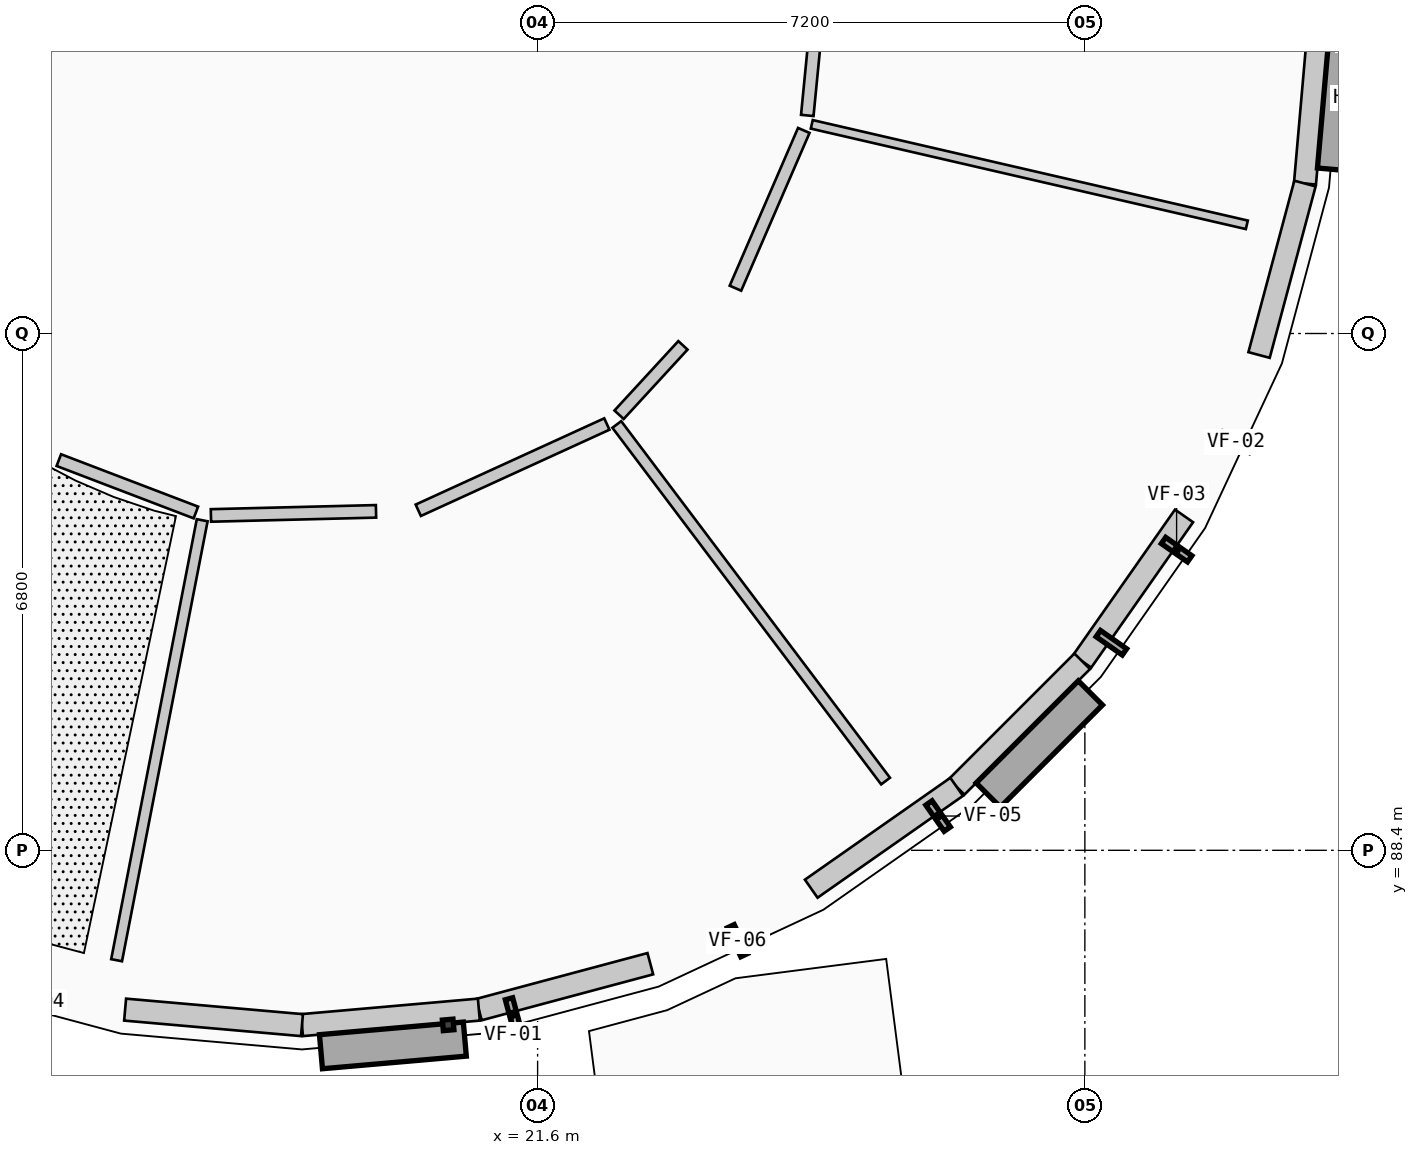
"""IFC4 building model, lengths in metres.
Left out: names, types, materials, properties, quantities, classifications, styles, units other than length and angle.
Written with IfcOpenShell. Run it as: python <this file> out.ifc"""

import sys

from ifc_helpers import new_model, si_unit, direction, frame, frame_2d, origin, origin_2d, place, context, subcontext, project, spatial, rectangle, circle, extrude, element, fill, save


model = new_model("IFC4")
c1 = context("Model", 3, precision=1e-05, world=origin(), true_north=direction((0.0, 1.0)))
c2 = subcontext(c1, "Body", "Model", "MODEL_VIEW")
j1 = project(units=[si_unit("LENGTHUNIT", "METRE"), si_unit("PLANEANGLEUNIT", "RADIAN")], contexts=[c1])
p1 = place(None, origin())
s1 = spatial("IfcSite", under=j1, at=p1, CompositionType="ELEMENT")
p2 = place(p1, origin())
s2 = spatial("IfcBuilding", under=s1, at=p2, CompositionType="ELEMENT")
p3 = place(p2, frame((0.0, 0.0, 4.55)))
s3 = spatial("IfcBuildingStorey", under=s2, at=p3, CompositionType="ELEMENT", Elevation=4.55)
for number, where, z_axis, x_axis in (
    (1, (16.263, 86.816, 0.0), (0.0, 0.0, 1.0), (1.0, 0.0, 0.0)),
    (2, (20.737, 86.816, 0.0), (0.0, 0.0, 1.0), (1.0, 0.0, 0.0)),
    (3, (24.94, 88.346, 0.0), (0.0, 0.0, 1.0), (1.0, 0.0, 0.0)),
    (4, (28.367, 91.221, 0.0), (0.0, 0.0, 1.0), (1.0, 0.0, 0.0)),
    (5, (30.603, 95.095, 0.0), (0.0, 0.0, 1.0), (1.0, 0.0, 0.0)),
    (6, (15.1, 93.611, 0.0), (0.0, 0.0, 1.0), (1.0, 0.0, 0.0)),
    (7, (19.681, 92.803, 0.0), (0.0, 0.0, 1.0), (1.0, 0.0, 0.0)),
    (8, (23.709, 95.129, 0.0), (0.0, 0.0, 1.0), (1.0, 0.0, 0.0)),
):
    element("IfcColumn", number, at=place(p3, frame(where, z_axis=z_axis, x_axis=x_axis)), inside=s3, PredefinedType="COLUMN", context=c2, shape_type="SweptSolid", body=[
        extrude(rectangle(XDim=0.42, YDim=0.42, at=origin_2d()), origin(), (0.0, 0.0, 1.0), 4.2),
    ])
for number, where, z_axis, x_axis in (
    (9, (22.436, 86.342, 0.0), (0.0, 0.0, 1.0), (1.0, 0.0, 0.0)),
    (10, (26.006, 86.802, 0.0), (0.0, 0.0, 1.0), (1.0, 0.0, 0.0)),
):
    element("IfcColumn", number, at=place(p3, frame(where, z_axis=z_axis, x_axis=x_axis)), inside=s3, PredefinedType="PILASTER", context=c2, shape_type="SweptSolid", body=[
        extrude(circle(Radius=0.19, at=origin_2d()), origin(), (0.0, 0.0, 1.0), 4.2),
    ])
p4 = place(p3, frame((31.9, 99.5, 0.0), z_axis=(0.0, 0.0, 1.0), x_axis=(-0.087274565792, -0.996184295282, 0.0)))
e11 = element("IfcWall", 11, at=p4, inside=s3, PredefinedType="ELEMENTEDWALL", context=c2, shape_type="SweptSolid", body=[
    extrude(rectangle(XDim=2.336, YDim=0.29, at=frame_2d((1.168, 0.0))), origin(), (0.0, 0.0, 1.0), 3.309),
])
p5 = place(p4, frame((0.568, 0.0, 0.85)))
e12 = element("IfcOpeningElement", 12, at=p5, cuts=e11, PredefinedType="OPENING", context=c2, shape_type="SweptSolid", body=[
    extrude(rectangle(XDim=1.2, YDim=1.35, at=frame_2d((0.6, 0.675))), frame((0.0, 0.155, 0.0), z_axis=(0.0, -1.0, 0.0), x_axis=(1.0, 0.0, 0.0)), (0.0, 0.0, 1.0), 0.31),
])
p6 = place(p3, frame((31.696, 97.173, 0.0), z_axis=(0.0, 0.0, 1.0), x_axis=(-0.258612423585, -0.965981166673, 0.0)))
e13 = element("IfcWall", 13, at=p6, inside=s3, PredefinedType="ELEMENTEDWALL", context=c2, shape_type="SweptSolid", body=[
    extrude(rectangle(XDim=2.335, YDim=0.29, at=frame_2d((1.168, 0.0))), origin(), (0.0, 0.0, 1.0), 3.309),
])
p7 = place(p6, frame((0.568, 0.0, 0.85)))
e14 = element("IfcOpeningElement", 14, at=p7, cuts=e13, PredefinedType="OPENING", context=c2, shape_type="SweptSolid", body=[
    extrude(rectangle(XDim=1.2, YDim=1.65, at=frame_2d((0.6, 0.825))), frame((0.0, 0.155, 0.0), z_axis=(0.0, -1.0, 0.0), x_axis=(1.0, 0.0, 0.0)), (0.0, 0.0, 1.0), 0.31),
])
p8 = place(p3, frame((30.105, 92.8, 0.0), z_axis=(0.0, 0.0, 1.0), x_axis=(-0.573728883722, -0.819045278347, 0.0)))
e15 = element("IfcWall", 15, at=p8, inside=s3, PredefinedType="ELEMENTEDWALL", context=c2, shape_type="SweptSolid", body=[
    extrude(rectangle(XDim=2.336, YDim=0.29, at=frame_2d((1.168, 0.0))), origin(), (0.0, 0.0, 1.0), 3.309),
])
p9 = place(p8, frame((0.568, 0.0, 0.85)))
e16 = element("IfcOpeningElement", 16, at=p9, cuts=e15, PredefinedType="OPENING", context=c2, shape_type="SweptSolid", body=[
    extrude(rectangle(XDim=1.2, YDim=1.95, at=frame_2d((0.6, 0.975))), frame((0.0, 0.155, 0.0), z_axis=(0.0, -1.0, 0.0), x_axis=(1.0, 0.0, 0.0)), (0.0, 0.0, 1.0), 0.31),
])
p10 = place(p3, frame((28.765, 90.887, 0.0), z_axis=(0.0, 0.0, 1.0), x_axis=(-0.707106781187, -0.707106781187, 0.0)))
e17 = element("IfcWall", 17, at=p10, inside=s3, PredefinedType="ELEMENTEDWALL", context=c2, shape_type="SweptSolid", body=[
    extrude(rectangle(XDim=2.336, YDim=0.29, at=frame_2d((1.168, 0.0))), origin(), (0.0, 0.0, 1.0), 3.309),
])
p11 = place(p10, frame((0.568, 0.0, 0.85)))
e18 = element("IfcOpeningElement", 18, at=p11, cuts=e17, PredefinedType="OPENING", context=c2, shape_type="SweptSolid", body=[
    extrude(rectangle(XDim=1.2, YDim=2.25, at=frame_2d((0.6, 1.125))), frame((0.0, 0.155, 0.0), z_axis=(0.0, -1.0, 0.0), x_axis=(1.0, 0.0, 0.0)), (0.0, 0.0, 1.0), 0.31),
])
p12 = place(p3, frame((27.113, 89.235, 0.0), z_axis=(0.0, 0.0, 1.0), x_axis=(-0.819045278347, -0.573728883722, 0.0)))
e19 = element("IfcWall", 19, at=p12, inside=s3, PredefinedType="ELEMENTEDWALL", context=c2, shape_type="SweptSolid", body=[
    extrude(rectangle(XDim=2.336, YDim=0.29, at=frame_2d((1.168, 0.0))), origin(), (0.0, 0.0, 1.0), 3.309),
])
p13 = place(p12, frame((0.558, 0.0, 0.85)))
e20 = element("IfcOpeningElement", 20, at=p13, cuts=e19, PredefinedType="OPENING", context=c2, shape_type="SweptSolid", body=[
    extrude(rectangle(XDim=1.22, YDim=1.5, at=frame_2d((0.61, 0.75))), frame((0.0, 0.155, 0.0), z_axis=(0.0, -1.0, 0.0), x_axis=(1.0, 0.0, 0.0)), (0.0, 0.0, 1.0), 0.31),
])
p14 = place(p3, frame((23.083, 86.908, 0.0), z_axis=(0.0, 0.0, 1.0), x_axis=(-0.965981166673, -0.258612423585, 0.0)))
e21 = element("IfcWall", 21, at=p14, inside=s3, PredefinedType="ELEMENTEDWALL", context=c2, shape_type="SweptSolid", body=[
    extrude(rectangle(XDim=2.335, YDim=0.29, at=frame_2d((1.168, 0.0))), origin(), (0.0, 0.0, 1.0), 3.309),
])
p15 = place(p3, frame((20.827, 86.304, 0.0), z_axis=(0.0, 0.0, 1.0), x_axis=(-0.996184295282, -0.087274565792, 0.0)))
e22 = element("IfcWall", 22, at=p15, inside=s3, PredefinedType="ELEMENTEDWALL", context=c2, shape_type="SweptSolid", body=[
    extrude(rectangle(XDim=2.336, YDim=0.29, at=frame_2d((1.168, 0.0))), origin(), (0.0, 0.0, 1.0), 3.309),
])
p16 = place(p15, frame((0.558, 0.0, 0.85)))
e23 = element("IfcOpeningElement", 23, at=p16, cuts=e22, PredefinedType="OPENING", context=c2, shape_type="SweptSolid", body=[
    extrude(rectangle(XDim=1.22, YDim=1.8, at=frame_2d((0.61, 0.9))), frame((0.0, 0.155, 0.0), z_axis=(0.0, -1.0, 0.0), x_axis=(1.0, 0.0, 0.0)), (0.0, 0.0, 1.0), 0.31),
])
p17 = place(p3, frame((18.5, 86.1, 0.0), z_axis=(0.0, 0.0, 1.0), x_axis=(-0.996184295282, 0.087274565792, 0.0)))
e24 = element("IfcWall", 24, at=p17, inside=s3, PredefinedType="ELEMENTEDWALL", context=c2, shape_type="SweptSolid", body=[
    extrude(rectangle(XDim=2.336, YDim=0.29, at=frame_2d((1.168, 0.0))), origin(), (0.0, 0.0, 1.0), 3.309),
])
p18 = place(p17, frame((0.543, 0.0, 0.85)))
e25 = element("IfcOpeningElement", 25, at=p18, cuts=e24, PredefinedType="OPENING", context=c2, shape_type="SweptSolid", body=[
    extrude(rectangle(XDim=1.25, YDim=1.5, at=frame_2d((0.625, 0.75))), frame((0.0, 0.155, 0.0), z_axis=(0.0, -1.0, 0.0), x_axis=(1.0, 0.0, 0.0)), (0.0, 0.0, 1.0), 0.31),
])
p19 = place(p3, frame((17.187, 92.743, 0.0), z_axis=(0.0, 0.0, 1.0), x_axis=(-0.190930602481, -0.981603537604, 0.0)))
e26 = element("IfcWall", 26, at=p19, inside=s3, PredefinedType="PARTITIONING", context=c2, shape_type="SweptSolid", body=[
    extrude(rectangle(XDim=5.897, YDim=0.145, at=frame_2d((2.949, 0.0))), origin(), (0.0, 0.0, 1.0), 3.284),
])
p20 = place(p3, frame((22.642, 94.003, 0.0), z_axis=(0.0, 0.0, 1.0), x_axis=(0.601846782462, -0.798611576701, 0.0)))
e27 = element("IfcWall", 27, at=p20, inside=s3, PredefinedType="PARTITIONING", context=c2, shape_type="SweptSolid", body=[
    extrude(rectangle(XDim=5.875, YDim=0.145, at=frame_2d((2.938, 0.0))), origin(), (0.0, 0.0, 1.0), 3.284),
])
p21 = place(p3, frame((25.207, 97.952, 0.0), z_axis=(0.0, 0.0, 1.0), x_axis=(0.97434915279, -0.225041614944, 0.0)))
e28 = element("IfcWall", 28, at=p21, inside=s3, PredefinedType="PARTITIONING", context=c2, shape_type="SweptSolid", body=[
    extrude(rectangle(XDim=5.875, YDim=0.115, at=frame_2d((2.937, 0.0))), origin(), (0.0, 0.0, 1.0), 3.284),
])
p22 = place(p3, frame((15.301, 93.534, 0.0), z_axis=(0.0, 0.0, 1.0), x_axis=(0.934122555003, -0.356952450944, 0.0)))
e29 = element("IfcWall", 29, at=p22, inside=s3, PredefinedType="PARTITIONING", context=c2, shape_type="SweptSolid", body=[
    extrude(rectangle(XDim=1.93, YDim=0.165, at=frame_2d((0.965, 0.0))), origin(), (0.0, 0.0, 1.0), 3.284),
])
p23 = place(p3, frame((17.302, 92.806, 0.0), z_axis=(0.0, 0.0, 1.0), x_axis=(0.999688838374, 0.024944466912, 0.0)))
e30 = element("IfcWall", 30, at=p23, inside=s3, PredefinedType="PARTITIONING", context=c2, shape_type="SweptSolid", body=[
    extrude(rectangle(XDim=2.173, YDim=0.165, at=frame_2d((1.086, 0.0))), origin(), (0.0, 0.0, 1.0), 3.284),
])
p24 = place(p23, frame((0.552, 0.0, 0.0)))
e31 = element("IfcOpeningElement", 31, at=p24, cuts=e30, PredefinedType="OPENING", context=c2, shape_type="SweptSolid", body=[
    extrude(rectangle(XDim=1.07, YDim=2.2, at=frame_2d((0.535, 1.1))), frame((0.0, 0.093, 0.0), z_axis=(0.0, -1.0, 0.0), x_axis=(1.0, 0.0, 0.0)), (0.0, 0.0, 1.0), 0.185),
])
p25 = place(p3, frame((20.03, 92.874, 0.0), z_axis=(0.0, 0.0, 1.0), x_axis=(0.909355526696, 0.416019862587, 0.0)))
e32 = element("IfcWall", 32, at=p25, inside=s3, PredefinedType="PARTITIONING", context=c2, shape_type="SweptSolid", body=[
    extrude(rectangle(XDim=2.728, YDim=0.165, at=frame_2d((1.364, 0.0))), origin(), (0.0, 0.0, 1.0), 3.284),
])
p26 = place(p3, frame((22.672, 94.131, 0.0), z_axis=(0.0, 0.0, 1.0), x_axis=(0.677069322474, 0.735919243236, 0.0)))
e33 = element("IfcWall", 33, at=p26, inside=s3, PredefinedType="PARTITIONING", context=c2, shape_type="SweptSolid", body=[
    extrude(rectangle(XDim=1.24, YDim=0.165, at=frame_2d((0.62, 0.0))), origin(), (0.0, 0.0, 1.0), 3.284),
])
p27 = place(p3, frame((24.203, 95.796, 0.0), z_axis=(0.0, 0.0, 1.0), x_axis=(0.397419678039, 0.917636964985, 0.0)))
e34 = element("IfcWall", 34, at=p27, inside=s3, PredefinedType="PARTITIONING", context=c2, shape_type="SweptSolid", body=[
    extrude(rectangle(XDim=2.262, YDim=0.165, at=frame_2d((1.131, 0.0))), origin(), (0.0, 0.0, 1.0), 3.284),
])
p28 = place(p27, frame((0.586, 0.0, 0.0)))
e35 = element("IfcOpeningElement", 35, at=p28, cuts=e34, PredefinedType="OPENING", context=c2, shape_type="SweptSolid", body=[
    extrude(rectangle(XDim=1.09, YDim=2.22, at=frame_2d((0.545, 1.11))), frame((0.0, 0.093, 0.0), z_axis=(0.0, -1.0, 0.0), x_axis=(1.0, 0.0, 0.0)), (0.0, 0.0, 1.0), 0.185),
])
p29 = place(p3, frame((25.148, 98.069, 0.0), z_axis=(0.0, 0.0, 1.0), x_axis=(0.097273334628, 0.995257704502, 0.0)))
e36 = element("IfcWall", 36, at=p29, inside=s3, PredefinedType="PARTITIONING", context=c2, shape_type="SweptSolid", body=[
    extrude(rectangle(XDim=1.225, YDim=0.165, at=frame_2d((0.612, 0.0))), origin(), (0.0, 0.0, 1.0), 3.284),
])
p30 = place(p5, origin())
e37 = element("IfcWindow", 37, at=p30, inside=s3, PartitioningType="SINGLE_PANEL", PredefinedType="WINDOW", context=c2, shape_type="SweptSolid", body=[
    extrude(rectangle(XDim=1.2, YDim=1.35, at=frame_2d((0.6, 0.675))), frame((0.0, 0.03, 0.0), z_axis=(0.0, -1.0, 0.0), x_axis=(1.0, 0.0, 0.0)), (0.0, 0.0, 1.0), 0.06),
])
fill(e12, e37)
p31 = place(p7, origin())
e38 = element("IfcWindow", 38, at=p31, inside=s3, PartitioningType="SINGLE_PANEL", PredefinedType="WINDOW", context=c2, shape_type="SweptSolid", body=[
    extrude(rectangle(XDim=1.2, YDim=1.65, at=frame_2d((0.6, 0.825))), frame((0.0, 0.03, 0.0), z_axis=(0.0, -1.0, 0.0), x_axis=(1.0, 0.0, 0.0)), (0.0, 0.0, 1.0), 0.06),
])
fill(e14, e38)
p32 = place(p9, origin())
e39 = element("IfcWindow", 39, at=p32, inside=s3, PartitioningType="SINGLE_PANEL", PredefinedType="WINDOW", context=c2, shape_type="SweptSolid", body=[
    extrude(rectangle(XDim=1.2, YDim=1.95, at=frame_2d((0.6, 0.975))), frame((0.0, 0.03, 0.0), z_axis=(0.0, -1.0, 0.0), x_axis=(1.0, 0.0, 0.0)), (0.0, 0.0, 1.0), 0.06),
])
fill(e16, e39)
p33 = place(p11, origin())
e40 = element("IfcWindow", 40, at=p33, inside=s3, PartitioningType="SINGLE_PANEL", PredefinedType="WINDOW", context=c2, shape_type="SweptSolid", body=[
    extrude(rectangle(XDim=1.2, YDim=2.25, at=frame_2d((0.6, 1.125))), frame((0.0, 0.03, 0.0), z_axis=(0.0, -1.0, 0.0), x_axis=(1.0, 0.0, 0.0)), (0.0, 0.0, 1.0), 0.06),
])
fill(e18, e40)
p34 = place(p13, origin())
e41 = element("IfcWindow", 41, at=p34, inside=s3, PartitioningType="SINGLE_PANEL", PredefinedType="WINDOW", context=c2, shape_type="SweptSolid", body=[
    extrude(rectangle(XDim=1.22, YDim=1.5, at=frame_2d((0.61, 0.75))), frame((0.0, 0.03, 0.0), z_axis=(0.0, -1.0, 0.0), x_axis=(1.0, 0.0, 0.0)), (0.0, 0.0, 1.0), 0.06),
])
fill(e20, e41)
p35 = place(p16, origin())
e42 = element("IfcWindow", 42, at=p35, inside=s3, PartitioningType="SINGLE_PANEL", PredefinedType="WINDOW", context=c2, shape_type="SweptSolid", body=[
    extrude(rectangle(XDim=1.22, YDim=1.8, at=frame_2d((0.61, 0.9))), frame((0.0, 0.03, 0.0), z_axis=(0.0, -1.0, 0.0), x_axis=(1.0, 0.0, 0.0)), (0.0, 0.0, 1.0), 0.06),
])
fill(e23, e42)
p36 = place(p18, origin())
e43 = element("IfcWindow", 43, at=p36, inside=s3, PartitioningType="SINGLE_PANEL", PredefinedType="WINDOW", context=c2, shape_type="SweptSolid", body=[
    extrude(rectangle(XDim=1.25, YDim=1.5, at=frame_2d((0.625, 0.75))), frame((0.0, 0.03, 0.0), z_axis=(0.0, -1.0, 0.0), x_axis=(1.0, 0.0, 0.0)), (0.0, 0.0, 1.0), 0.06),
])
fill(e25, e43)
p37 = place(p24, origin())
e44 = element("IfcDoor", 44, at=p37, inside=s3, OperationType="SINGLE_SWING_LEFT", PredefinedType="DOOR", context=c2, shape_type="SweptSolid", body=[
    extrude(rectangle(XDim=1.07, YDim=2.2, at=frame_2d((0.535, 1.1))), frame((0.0, 0.025, 0.0), z_axis=(0.0, -1.0, 0.0), x_axis=(1.0, 0.0, 0.0)), (0.0, 0.0, 1.0), 0.05),
])
fill(e31, e44)
p38 = place(p28, origin())
e45 = element("IfcDoor", 45, at=p38, inside=s3, OperationType="SINGLE_SWING_RIGHT", PredefinedType="DOOR", context=c2, shape_type="SweptSolid", body=[
    extrude(rectangle(XDim=1.09, YDim=2.22, at=frame_2d((0.545, 1.11))), frame((0.0, 0.025, 0.0), z_axis=(0.0, -1.0, 0.0), x_axis=(1.0, 0.0, 0.0)), (0.0, 0.0, 1.0), 0.05),
])
fill(e35, e45)
save(model, sys.argv[1])
